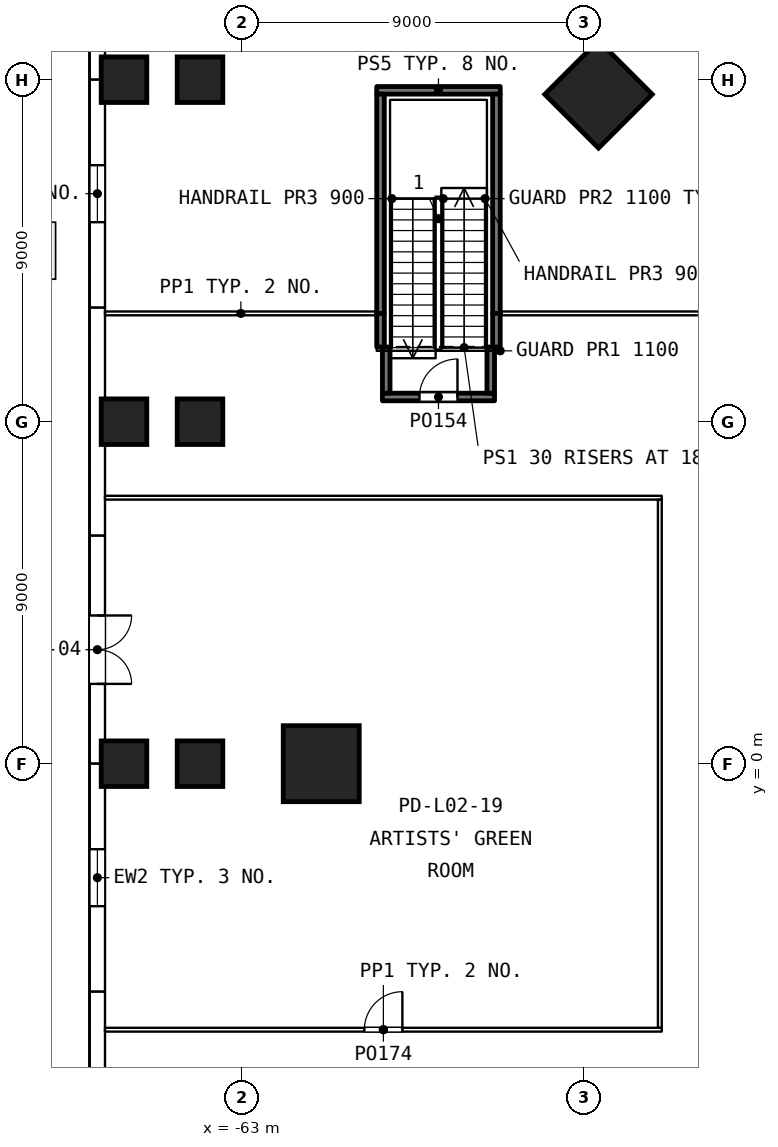
"""IFC4 building model, lengths in metres.
Left out: names, types, materials, properties, quantities, classifications, styles, units other than length and angle.
Written with IfcOpenShell. Run it as: python <this file> out.ifc"""

import sys

from ifc_helpers import new_model, si_unit, direction, frame, frame_2d, origin, origin_2d, place, context, subcontext, project, spatial, rectangle, extrude, element, fill, save


model = new_model("IFC4")
c1 = context("Model", 3, precision=1e-05, world=origin(), true_north=direction((0.0, 1.0)))
c2 = subcontext(c1, "Body", "Model", "MODEL_VIEW")
j1 = project(units=[si_unit("LENGTHUNIT", "METRE"), si_unit("PLANEANGLEUNIT", "RADIAN")], contexts=[c1])
p1 = place(None, origin())
s1 = spatial("IfcSite", under=j1, at=p1, CompositionType="ELEMENT")
p2 = place(p1, origin())
s2 = spatial("IfcBuilding", under=s1, at=p2, CompositionType="ELEMENT")
p3 = place(p2, frame((0.0, 0.0, 12.6)))
s3 = spatial("IfcBuildingStorey", under=s2, at=p3, CompositionType="ELEMENT", Elevation=12.6)
for number, where, z_axis, x_axis in (
    (1, (-66.1, 0.0, 0.0), (0.0, 0.0, 1.0), (1.0, 0.0, 0.0)),
    (2, (-66.1, 9.0, 0.0), (0.0, 0.0, 1.0), (1.0, 0.0, 0.0)),
    (3, (-66.1, 18.0, 0.0), (0.0, 0.0, 1.0), (1.0, 0.0, 0.0)),
    (4, (-64.1, 0.0, 0.0), (0.0, 0.0, 1.0), (1.0, 0.0, 0.0)),
    (5, (-64.1, 9.0, 0.0), (0.0, 0.0, 1.0), (1.0, 0.0, 0.0)),
    (6, (-64.1, 18.0, 0.0), (0.0, 0.0, 1.0), (1.0, 0.0, 0.0)),
):
    element("IfcColumn", number, at=place(p3, frame(where, z_axis=z_axis, x_axis=x_axis)), inside=s3, PredefinedType="COLUMN", context=c2, shape_type="SweptSolid", body=[
        extrude(rectangle(XDim=1.2, YDim=1.2, at=origin_2d()), origin(), (0.0, 0.0, 1.0), 5.4),
    ])
for number, where, z_axis, x_axis in (
    (7, (-53.614, 17.614, 0.0), (0.0, 0.0, 1.0), (-0.707, 0.707, 0.0)),
    (8, (-60.91, 0.0, 0.0), (0.0, 0.0, 1.0), (-1.0, 0.0, 0.0)),
):
    element("IfcColumn", number, at=place(p3, frame(where, z_axis=z_axis, x_axis=x_axis)), inside=s3, PredefinedType="COLUMN", context=c2, shape_type="SweptSolid", body=[
        extrude(rectangle(XDim=2.0, YDim=2.0, at=origin_2d()), origin(), (0.0, 0.0, 1.0), 5.4),
    ])
p4 = place(p3, frame((-66.8, 24.0, 0.0), z_axis=(0.0, 0.0, 1.0), x_axis=(0.0, -1.0, 0.0)))
e9 = element("IfcWall", 9, at=p4, inside=s3, PredefinedType="SOLIDWALL", context=c2, shape_type="SweptSolid", body=[
    extrude(rectangle(XDim=6.0, YDim=0.4, at=frame_2d((3.0, 0.0))), origin(), (0.0, 0.0, 1.0), 5.1),
])
p5 = place(p4, frame((2.25, 0.0, 1.0)))
e10 = element("IfcOpeningElement", 10, at=p5, cuts=e9, PredefinedType="OPENING", context=c2, shape_type="SweptSolid", body=[
    extrude(rectangle(XDim=1.5, YDim=2.4, at=frame_2d((0.75, 1.2))), frame((0.0, 0.21, 0.0), z_axis=(0.0, -1.0, 0.0), x_axis=(1.0, 0.0, 0.0)), (0.0, 0.0, 1.0), 0.42),
])
p6 = place(p3, frame((-66.8, 18.0, 0.0), z_axis=(0.0, 0.0, 1.0), x_axis=(0.0, -1.0, 0.0)))
e11 = element("IfcWall", 11, at=p6, inside=s3, PredefinedType="SOLIDWALL", context=c2, shape_type="SweptSolid", body=[
    extrude(rectangle(XDim=6.0, YDim=0.4, at=frame_2d((3.0, 0.0))), origin(), (0.0, 0.0, 1.0), 5.1),
])
p7 = place(p6, frame((2.25, 0.0, 1.0)))
e12 = element("IfcOpeningElement", 12, at=p7, cuts=e11, PredefinedType="OPENING", context=c2, shape_type="SweptSolid", body=[
    extrude(rectangle(XDim=1.5, YDim=2.4, at=frame_2d((0.75, 1.2))), frame((0.0, 0.21, 0.0), z_axis=(0.0, -1.0, 0.0), x_axis=(1.0, 0.0, 0.0)), (0.0, 0.0, 1.0), 0.42),
])
p8 = place(p3, frame((-66.8, 12.0, 0.0), z_axis=(0.0, 0.0, 1.0), x_axis=(0.0, -1.0, 0.0)))
e13 = element("IfcWall", 13, at=p8, inside=s3, PredefinedType="SOLIDWALL", context=c2, shape_type="SweptSolid", body=[
    extrude(rectangle(XDim=6.0, YDim=0.4, at=frame_2d((3.0, 0.0))), origin(), (0.0, 0.0, 1.0), 5.1),
])
p9 = place(p3, frame((-66.8, 6.0, 0.0), z_axis=(0.0, 0.0, 1.0), x_axis=(0.0, -1.0, 0.0)))
e14 = element("IfcWall", 14, at=p9, inside=s3, PredefinedType="SOLIDWALL", context=c2, shape_type="SweptSolid", body=[
    extrude(rectangle(XDim=6.0, YDim=0.4, at=frame_2d((3.0, 0.0))), origin(), (0.0, 0.0, 1.0), 5.1),
])
p10 = place(p9, frame((2.1, 0.0, 0.0)))
e15 = element("IfcOpeningElement", 15, at=p10, cuts=e14, PredefinedType="OPENING", context=c2, shape_type="SweptSolid", body=[
    extrude(rectangle(XDim=1.8, YDim=2.4, at=frame_2d((0.9, 1.2))), frame((0.0, 0.21, 0.0), z_axis=(0.0, -1.0, 0.0), x_axis=(1.0, 0.0, 0.0)), (0.0, 0.0, 1.0), 0.42),
])
p11 = place(p3, frame((-66.8, 0.0, 0.0), z_axis=(0.0, 0.0, 1.0), x_axis=(0.0, -1.0, 0.0)))
e16 = element("IfcWall", 16, at=p11, inside=s3, PredefinedType="SOLIDWALL", context=c2, shape_type="SweptSolid", body=[
    extrude(rectangle(XDim=6.0, YDim=0.4, at=frame_2d((3.0, 0.0))), origin(), (0.0, 0.0, 1.0), 5.1),
])
p12 = place(p11, frame((2.25, 0.0, 1.0)))
e17 = element("IfcOpeningElement", 17, at=p12, cuts=e16, PredefinedType="OPENING", context=c2, shape_type="SweptSolid", body=[
    extrude(rectangle(XDim=1.5, YDim=2.4, at=frame_2d((0.75, 1.2))), frame((0.0, 0.21, 0.0), z_axis=(0.0, -1.0, 0.0), x_axis=(1.0, 0.0, 0.0)), (0.0, 0.0, 1.0), 0.42),
])
p13 = place(p3, frame((-66.8, -6.0, 0.0), z_axis=(0.0, 0.0, 1.0), x_axis=(0.0, -1.0, 0.0)))
e18 = element("IfcWall", 18, at=p13, inside=s3, PredefinedType="SOLIDWALL", context=c2, shape_type="SweptSolid", body=[
    extrude(rectangle(XDim=6.0, YDim=0.4, at=frame_2d((3.0, 0.0))), origin(), (0.0, 0.0, 1.0), 5.1),
])
p14 = place(p13, frame((3.65, 0.0, 1.0)))
e19 = element("IfcOpeningElement", 19, at=p14, cuts=e18, PredefinedType="OPENING", context=c2, shape_type="SweptSolid", body=[
    extrude(rectangle(XDim=1.5, YDim=2.4, at=frame_2d((0.75, 1.2))), frame((0.0, 0.21, 0.0), z_axis=(0.0, -1.0, 0.0), x_axis=(1.0, 0.0, 0.0)), (0.0, 0.0, 1.0), 0.42),
])
p15 = place(p3, frame((-59.45, 17.72, 0.0), z_axis=(0.0, 0.0, 1.0), x_axis=(1.0, 0.0, 0.0)))
e20 = element("IfcWall", 20, at=p15, inside=s3, PredefinedType="SOLIDWALL", context=c2, shape_type="SweptSolid", body=[
    extrude(rectangle(XDim=3.25, YDim=0.2, at=frame_2d((1.625, 0.0))), origin(), (0.0, 0.0, 1.0), 5.1),
])
for number, where, z_axis, x_axis in (
    (21, (-59.35, 11.85, 0.0), (0.0, 0.0, 1.0), (0.0, 1.0, 0.0)),
    (22, (-56.3, 11.85, 0.0), (0.0, 0.0, 1.0), (0.0, 1.0, 0.0)),
):
    element("IfcWall", number, at=place(p3, frame(where, z_axis=z_axis, x_axis=x_axis)), inside=s3, PredefinedType="SOLIDWALL", context=c2, shape_type="SweptSolid", body=[
        extrude(rectangle(XDim=5.77, YDim=0.2, at=frame_2d((2.885, 0.0))), origin(), (0.0, 0.0, 1.0), 5.1),
    ])
p16 = place(p3, frame((-59.3, 9.65, 0.0), z_axis=(0.0, 0.0, 1.0), x_axis=(1.0, 0.0, 0.0)))
e23 = element("IfcWall", 23, at=p16, inside=s3, PredefinedType="SOLIDWALL", context=c2, shape_type="SweptSolid", body=[
    extrude(rectangle(XDim=2.95, YDim=0.2, at=frame_2d((1.475, 0.0))), origin(), (0.0, 0.0, 1.0), 5.1),
])
p17 = place(p16, frame((0.975, 0.0, 0.0)))
e24 = element("IfcOpeningElement", 24, at=p17, cuts=e23, PredefinedType="OPENING", context=c2, shape_type="SweptSolid", body=[
    extrude(rectangle(XDim=1.0, YDim=2.1, at=frame_2d((0.5, 1.05))), frame((0.0, 0.11, 0.0), z_axis=(0.0, -1.0, 0.0), x_axis=(1.0, 0.0, 0.0)), (0.0, 0.0, 1.0), 0.22),
])
p18 = place(p3, frame((-59.35, 10.965, 0.0), z_axis=(0.0, 0.0, 1.0), x_axis=(0.0, 1.0, 0.0)))
e25 = element("IfcWall", 25, at=p18, inside=s3, PredefinedType="SOLIDWALL", context=c2, shape_type="SweptSolid", body=[
    extrude(rectangle(XDim=0.885, YDim=0.2, at=frame_2d((0.442, 0.0))), origin(), (0.0, 0.0, 1.0), 5.1),
])
for number, where, z_axis, x_axis in (
    (26, (-59.2, 9.75, 0.0), (0.0, 0.0, 1.0), (0.0, 1.0, 0.0)),
    (27, (-56.45, 9.75, 0.0), (0.0, 0.0, 1.0), (0.0, 1.0, 0.0)),
):
    element("IfcWall", number, at=place(p3, frame(where, z_axis=z_axis, x_axis=x_axis)), inside=s3, PredefinedType="SOLIDWALL", context=c2, shape_type="SweptSolid", body=[
        extrude(rectangle(XDim=1.215, YDim=0.2, at=frame_2d((0.607, 0.0))), origin(), (0.0, 0.0, 1.0), 5.1),
    ])
p19 = place(p3, frame((-56.3, 10.965, 0.0), z_axis=(0.0, 0.0, 1.0), x_axis=(0.0, 1.0, 0.0)))
e28 = element("IfcWall", 28, at=p19, inside=s3, PredefinedType="SOLIDWALL", context=c2, shape_type="SweptSolid", body=[
    extrude(rectangle(XDim=0.885, YDim=0.2, at=frame_2d((0.442, 0.0))), origin(), (0.0, 0.0, 1.0), 5.1),
])
p20 = place(p3, frame((-66.6, 11.85, 0.0), z_axis=(0.0, 0.0, 1.0), x_axis=(1.0, 0.0, 0.0)))
e29 = element("IfcWall", 29, at=p20, inside=s3, PredefinedType="PARTITIONING", context=c2, shape_type="SweptSolid", body=[
    extrude(rectangle(XDim=7.15, YDim=0.1, at=frame_2d((3.575, 0.0))), origin(), (0.0, 0.0, 1.0), 5.1),
])
p21 = place(p3, frame((-56.2, 11.85, 0.0), z_axis=(0.0, 0.0, 1.0), x_axis=(1.0, 0.0, 0.0)))
e30 = element("IfcWall", 30, at=p21, inside=s3, PredefinedType="PARTITIONING", context=c2, shape_type="SweptSolid", body=[
    extrude(rectangle(XDim=36.05, YDim=0.1, at=frame_2d((18.025, 0.0))), origin(), (0.0, 0.0, 1.0), 5.1),
])
p22 = place(p21, frame((17.125, 0.0, 0.0)))
e31 = element("IfcOpeningElement", 31, at=p22, cuts=e30, PredefinedType="OPENING", context=c2, shape_type="SweptSolid", body=[
    extrude(rectangle(XDim=1.8, YDim=2.1, at=frame_2d((0.9, 1.05))), frame((0.0, 0.06, 0.0), z_axis=(0.0, -1.0, 0.0), x_axis=(1.0, 0.0, 0.0)), (0.0, 0.0, 1.0), 0.12),
])
p23 = place(p3, frame((-66.6, -7.0, 0.0), z_axis=(0.0, 0.0, 1.0), x_axis=(1.0, 0.0, 0.0)))
e32 = element("IfcWall", 32, at=p23, inside=s3, PredefinedType="PARTITIONING", context=c2, shape_type="SweptSolid", body=[
    extrude(rectangle(XDim=14.65, YDim=0.1, at=frame_2d((7.325, 0.0))), origin(), (0.0, 0.0, 1.0), 5.1),
])
p24 = place(p23, frame((6.825, 0.0, 0.0)))
e33 = element("IfcOpeningElement", 33, at=p24, cuts=e32, PredefinedType="OPENING", context=c2, shape_type="SweptSolid", body=[
    extrude(rectangle(XDim=1.0, YDim=2.1, at=frame_2d((0.5, 1.05))), frame((0.0, 0.06, 0.0), z_axis=(0.0, -1.0, 0.0), x_axis=(1.0, 0.0, 0.0)), (0.0, 0.0, 1.0), 0.12),
])
p25 = place(p3, frame((-66.6, 7.0, 0.0), z_axis=(0.0, 0.0, 1.0), x_axis=(1.0, 0.0, 0.0)))
e34 = element("IfcWall", 34, at=p25, inside=s3, PredefinedType="PARTITIONING", context=c2, shape_type="SweptSolid", body=[
    extrude(rectangle(XDim=14.65, YDim=0.1, at=frame_2d((7.325, 0.0))), origin(), (0.0, 0.0, 1.0), 5.1),
])
p26 = place(p3, frame((-52.0, -6.95, 0.0), z_axis=(0.0, 0.0, 1.0), x_axis=(0.0, 1.0, 0.0)))
e35 = element("IfcWall", 35, at=p26, inside=s3, PredefinedType="PARTITIONING", context=c2, shape_type="SweptSolid", body=[
    extrude(rectangle(XDim=13.9, YDim=0.1, at=frame_2d((6.95, 0.0))), origin(), (0.0, 0.0, 1.0), 5.1),
])
p27 = place(p7, origin())
e36 = element("IfcWindow", 36, at=p27, inside=s3, PartitioningType="SINGLE_PANEL", PredefinedType="WINDOW", context=c2, shape_type="SweptSolid", body=[
    extrude(rectangle(XDim=1.5, YDim=2.4, at=frame_2d((0.75, 1.2))), frame((0.0, 0.03, 0.0), z_axis=(0.0, -1.0, 0.0), x_axis=(1.0, 0.0, 0.0)), (0.0, 0.0, 1.0), 0.06),
])
fill(e12, e36)
p28 = place(p10, origin())
e37 = element("IfcDoor", 37, at=p28, inside=s3, OperationType="SINGLE_SWING_LEFT", PredefinedType="DOOR", context=c2, shape_type="SweptSolid", body=[
    extrude(rectangle(XDim=1.8, YDim=2.4, at=frame_2d((0.9, 1.2))), frame((0.0, 0.025, 0.0), z_axis=(0.0, -1.0, 0.0), x_axis=(1.0, 0.0, 0.0)), (0.0, 0.0, 1.0), 0.05),
])
fill(e15, e37)
p29 = place(p12, origin())
e38 = element("IfcWindow", 38, at=p29, inside=s3, PartitioningType="SINGLE_PANEL", PredefinedType="WINDOW", context=c2, shape_type="SweptSolid", body=[
    extrude(rectangle(XDim=1.5, YDim=2.4, at=frame_2d((0.75, 1.2))), frame((0.0, 0.03, 0.0), z_axis=(0.0, -1.0, 0.0), x_axis=(1.0, 0.0, 0.0)), (0.0, 0.0, 1.0), 0.06),
])
fill(e17, e38)
p30 = place(p17, origin())
e39 = element("IfcDoor", 39, at=p30, inside=s3, OperationType="SINGLE_SWING_RIGHT", PredefinedType="DOOR", context=c2, shape_type="SweptSolid", body=[
    extrude(rectangle(XDim=1.0, YDim=2.1, at=frame_2d((0.5, 1.05))), frame((0.0, 0.025, 0.0), z_axis=(0.0, -1.0, 0.0), x_axis=(1.0, 0.0, 0.0)), (0.0, 0.0, 1.0), 0.05),
])
fill(e24, e39)
p31 = place(p24, origin())
e40 = element("IfcDoor", 40, at=p31, inside=s3, OperationType="SINGLE_SWING_RIGHT", PredefinedType="DOOR", context=c2, shape_type="SweptSolid", body=[
    extrude(rectangle(XDim=1.0, YDim=2.1, at=frame_2d((0.5, 1.05))), frame((0.0, 0.025, 0.0), z_axis=(0.0, -1.0, 0.0), x_axis=(1.0, 0.0, 0.0)), (0.0, 0.0, 1.0), 0.05),
])
fill(e33, e40)
save(model, sys.argv[1])
